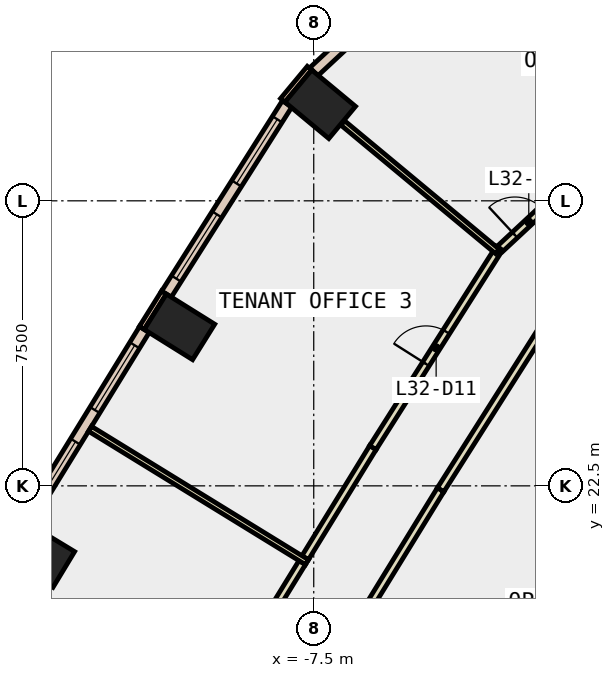
"""IFC4 building model, lengths in metres.
Left out: names, types, materials, properties, quantities, classifications, styles, units other than length and angle.
Written with IfcOpenShell. Run it as: python <this file> out.ifc"""

import sys

from ifc_helpers import new_model, si_unit, direction, frame, frame_2d, origin, origin_2d, place, context, subcontext, project, spatial, rectangle, extrude, element, fill, save


model = new_model("IFC4")
c1 = context("Model", 3, precision=1e-05, world=origin(), true_north=direction((0.0, 1.0)))
c2 = subcontext(c1, "Body", "Model", "MODEL_VIEW")
j1 = project(units=[si_unit("LENGTHUNIT", "METRE"), si_unit("PLANEANGLEUNIT", "RADIAN")], contexts=[c1])
p1 = place(None, origin())
s1 = spatial("IfcSite", under=j1, at=p1, CompositionType="ELEMENT")
p2 = place(p1, origin())
s2 = spatial("IfcBuilding", under=s1, at=p2, CompositionType="ELEMENT")
p3 = place(p2, frame((0.0, 0.0, 146.6)))
s3 = spatial("IfcBuildingStorey", under=s2, at=p3, CompositionType="ELEMENT", Elevation=146.6)
for number, where, z_axis, x_axis in (
    (1, (-7.329, 32.541, -0.4), (0.0, 0.0, 1.0), (0.639, 0.769, 0.0)),
    (2, (-11.033, 26.684, -0.4), (0.0, 0.0, 1.0), (0.53, 0.848, 0.0)),
    (3, (-14.719, 20.688, -0.4), (0.0, 0.0, 1.0), (0.518, 0.855, 0.0)),
):
    element("IfcColumn", number, at=place(p3, frame(where, z_axis=z_axis, x_axis=x_axis)), inside=s3, PredefinedType="COLUMN", context=c2, shape_type="SweptSolid", body=[
        extrude(rectangle(XDim=1.1, YDim=1.5, at=origin_2d()), origin(), (0.0, 0.0, 1.0), 4.2),
    ])
p4 = place(p3, frame((-7.612, 33.491, 0.0), z_axis=(0.0, 0.0, 1.0), x_axis=(-0.639070205934, -0.769148406933, 0.0)))
e4 = element("IfcWall", 4, at=p4, inside=s3, PredefinedType="STANDARD", context=c2, shape_type="SweptSolid", body=[
    extrude(rectangle(XDim=1.1, YDim=0.15, at=frame_2d((0.55, 0.0))), origin(), (0.0, 0.0, 1.0), 3.8),
])
p5 = place(p3, frame((-11.441, 27.588, 0.0), z_axis=(0.0, 0.0, 1.0), x_axis=(-0.52997899071, -0.848010771987, 0.0)))
e5 = element("IfcWall", 5, at=p5, inside=s3, PredefinedType="STANDARD", context=c2, shape_type="SweptSolid", body=[
    extrude(rectangle(XDim=1.1, YDim=0.15, at=frame_2d((0.55, 0.0))), origin(), (0.0, 0.0, 1.0), 3.8),
])
p6 = place(p3, frame((-4.91, 35.805, 0.0), z_axis=(0.0, 0.0, 1.0), x_axis=(-0.732121882671, -0.681173655475, 0.0)))
e6 = element("IfcWall", 6, at=p6, inside=s3, PredefinedType="STANDARD", context=c2, shape_type="SweptSolid", body=[
    extrude(rectangle(XDim=3.536, YDim=0.3, at=frame_2d((1.768, 0.0))), origin(), (0.0, 0.0, 1.0), 3.8),
])
p7 = place(p6, frame((1.068, 0.0, 0.9)))
e7 = element("IfcOpeningElement", 7, at=p7, cuts=e6, PredefinedType="OPENING", context=c2, shape_type="SweptSolid", body=[
    extrude(rectangle(XDim=1.4, YDim=2.6, at=frame_2d((0.7, 1.3))), frame((0.0, 0.16, 0.0), z_axis=(0.0, -1.0, 0.0), x_axis=(1.0, 0.0, 0.0)), (0.0, 0.0, 1.0), 0.32),
])
p8 = place(p3, frame((-8.201, 32.552, 0.0), z_axis=(0.0, 0.0, 1.0), x_axis=(-0.535403761464, -0.844596242124, 0.0)))
e8 = element("IfcWall", 8, at=p8, inside=s3, PredefinedType="STANDARD", context=c2, shape_type="SweptSolid", body=[
    extrude(rectangle(XDim=5.928, YDim=0.3, at=frame_2d((2.964, 0.0))), origin(), (0.0, 0.0, 1.0), 3.8),
])
p9 = place(p8, frame((0.482, 0.0, 0.9)))
e9 = element("IfcOpeningElement", 9, at=p9, cuts=e8, PredefinedType="OPENING", context=c2, shape_type="SweptSolid", body=[
    extrude(rectangle(XDim=2.0, YDim=2.6, at=frame_2d((1.0, 1.3))), frame((0.0, 0.16, 0.0), z_axis=(0.0, -1.0, 0.0), x_axis=(1.0, 0.0, 0.0)), (0.0, 0.0, 1.0), 0.32),
])
p10 = place(p8, frame((3.446, 0.0, 0.9)))
e10 = element("IfcOpeningElement", 10, at=p10, cuts=e8, PredefinedType="OPENING", context=c2, shape_type="SweptSolid", body=[
    extrude(rectangle(XDim=2.0, YDim=2.6, at=frame_2d((1.0, 1.3))), frame((0.0, 0.16, 0.0), z_axis=(0.0, -1.0, 0.0), x_axis=(1.0, 0.0, 0.0)), (0.0, 0.0, 1.0), 0.32),
])
p11 = place(p3, frame((-11.956, 26.614, 0.0), z_axis=(0.0, 0.0, 1.0), x_axis=(-0.523719731127, -0.851890628677, 0.0)))
e11 = element("IfcWall", 11, at=p11, inside=s3, PredefinedType="STANDARD", context=c2, shape_type="SweptSolid", body=[
    extrude(rectangle(XDim=5.952, YDim=0.3, at=frame_2d((2.976, 0.0))), origin(), (0.0, 0.0, 1.0), 3.8),
])
p12 = place(p11, frame((0.488, 0.0, 0.9)))
e12 = element("IfcOpeningElement", 12, at=p12, cuts=e11, PredefinedType="OPENING", context=c2, shape_type="SweptSolid", body=[
    extrude(rectangle(XDim=2.0, YDim=2.6, at=frame_2d((1.0, 1.3))), frame((0.0, 0.16, 0.0), z_axis=(0.0, -1.0, 0.0), x_axis=(1.0, 0.0, 0.0)), (0.0, 0.0, 1.0), 0.32),
])
p13 = place(p11, frame((3.464, 0.0, 0.9)))
e13 = element("IfcOpeningElement", 13, at=p13, cuts=e11, PredefinedType="OPENING", context=c2, shape_type="SweptSolid", body=[
    extrude(rectangle(XDim=2.0, YDim=2.6, at=frame_2d((1.0, 1.3))), frame((0.0, 0.16, 0.0), z_axis=(0.0, -1.0, 0.0), x_axis=(1.0, 0.0, 0.0)), (0.0, 0.0, 1.0), 0.32),
])
p14 = place(p3, frame((-0.988, 27.401, 0.0), z_axis=(0.0, 0.0, 1.0), x_axis=(-0.535496886312, -0.844537201519, 0.0)))
e14 = element("IfcWall", 14, at=p14, inside=s3, PredefinedType="PARTITIONING", context=c2, shape_type="SweptSolid", body=[
    extrude(rectangle(XDim=5.927, YDim=0.2, at=frame_2d((2.964, 0.0))), origin(), (0.0, 0.0, 1.0), 3.8),
])
p15 = place(p3, frame((-4.162, 22.395, 0.0), z_axis=(0.0, 0.0, 1.0), x_axis=(-0.523625371849, -0.851948631055, 0.0)))
e15 = element("IfcWall", 15, at=p15, inside=s3, PredefinedType="PARTITIONING", context=c2, shape_type="SweptSolid", body=[
    extrude(rectangle(XDim=6.927, YDim=0.2, at=frame_2d((3.463, 0.0))), origin(), (0.0, 0.0, 1.0), 3.8),
])
p16 = place(p3, frame((-2.597, 28.738, 0.0), z_axis=(0.0, 0.0, 1.0), x_axis=(0.73206471367, 0.681235095249, 0.0)))
e16 = element("IfcWall", 16, at=p16, inside=s3, PredefinedType="PARTITIONING", context=c2, shape_type="SweptSolid", body=[
    extrude(rectangle(XDim=2.065, YDim=0.2, at=frame_2d((1.033, 0.0))), origin(), (0.0, 0.0, 1.0), 3.8),
])
p17 = place(p16, frame((0.532, 0.0, 0.0)))
e17 = element("IfcOpeningElement", 17, at=p17, cuts=e16, PredefinedType="OPENING", context=c2, shape_type="SweptSolid", body=[
    extrude(rectangle(XDim=1.0, YDim=2.1, at=frame_2d((0.5, 1.05))), frame((0.0, 0.11, 0.0), z_axis=(0.0, -1.0, 0.0), x_axis=(1.0, 0.0, 0.0)), (0.0, 0.0, 1.0), 0.22),
])
p18 = place(p3, frame((-7.725, 20.608, 0.0), z_axis=(0.0, 0.0, 1.0), x_axis=(0.523645038298, 0.851936543333, 0.0)))
e18 = element("IfcWall", 18, at=p18, inside=s3, PredefinedType="PARTITIONING", context=c2, shape_type="SweptSolid", body=[
    extrude(rectangle(XDim=3.403, YDim=0.2, at=frame_2d((1.702, 0.0))), origin(), (0.0, 0.0, 1.0), 3.8),
])
p19 = place(p3, frame((-5.943, 23.507, 0.0), z_axis=(0.0, 0.0, 1.0), x_axis=(0.535529721247, 0.844516380931, 0.0)))
e19 = element("IfcWall", 19, at=p19, inside=s3, PredefinedType="PARTITIONING", context=c2, shape_type="SweptSolid", body=[
    extrude(rectangle(XDim=6.213, YDim=0.2, at=frame_2d((3.106, 0.0))), origin(), (0.0, 0.0, 1.0), 3.8),
])
p20 = place(p19, frame((2.607, 0.0, 0.0)))
e20 = element("IfcOpeningElement", 20, at=p20, cuts=e19, PredefinedType="OPENING", context=c2, shape_type="SweptSolid", body=[
    extrude(rectangle(XDim=1.0, YDim=2.1, at=frame_2d((0.5, 1.05))), frame((0.0, 0.11, 0.0), z_axis=(0.0, -1.0, 0.0), x_axis=(1.0, 0.0, 0.0)), (0.0, 0.0, 1.0), 0.22),
])
p21 = place(p3, frame((-9.586, 17.581, 0.0), z_axis=(0.0, 0.0, 1.0), x_axis=(0.523757261565, 0.851867554822, 0.0)))
e21 = element("IfcWall", 21, at=p21, inside=s3, PredefinedType="PARTITIONING", context=c2, shape_type="SweptSolid", body=[
    extrude(rectangle(XDim=3.404, YDim=0.2, at=frame_2d((1.702, 0.0))), origin(), (0.0, 0.0, 1.0), 3.8),
])
p22 = place(p3, frame((-2.67, 28.67, 0.0), z_axis=(0.0, 0.0, 1.0), x_axis=(-0.769162789992, 0.639052894909, 0.0)))
e22 = element("IfcWall", 22, at=p22, inside=s3, PredefinedType="PARTITIONING", context=c2, shape_type="SweptSolid", body=[
    extrude(rectangle(XDim=5.288, YDim=0.15, at=frame_2d((2.644, 0.0))), origin(), (0.0, 0.0, 1.0), 3.8),
])
p23 = place(p3, frame((-7.679, 20.492, 0.0), z_axis=(0.0, 0.0, 1.0), x_axis=(-0.851897179877, 0.523709074695, 0.0)))
e23 = element("IfcWall", 23, at=p23, inside=s3, PredefinedType="PARTITIONING", context=c2, shape_type="SweptSolid", body=[
    extrude(rectangle(XDim=6.7, YDim=0.15, at=frame_2d((3.35, 0.0))), origin(), (0.0, 0.0, 1.0), 3.8),
])
p24 = place(p9, origin())
e24 = element("IfcWindow", 24, at=p24, inside=s3, PartitioningType="SINGLE_PANEL", PredefinedType="WINDOW", context=c2, shape_type="SweptSolid", body=[
    extrude(rectangle(XDim=2.0, YDim=2.6, at=frame_2d((1.0, 1.3))), frame((0.0, 0.03, 0.0), z_axis=(0.0, -1.0, 0.0), x_axis=(1.0, 0.0, 0.0)), (0.0, 0.0, 1.0), 0.06),
])
fill(e9, e24)
p25 = place(p10, origin())
e25 = element("IfcWindow", 25, at=p25, inside=s3, PartitioningType="SINGLE_PANEL", PredefinedType="WINDOW", context=c2, shape_type="SweptSolid", body=[
    extrude(rectangle(XDim=2.0, YDim=2.6, at=frame_2d((1.0, 1.3))), frame((0.0, 0.03, 0.0), z_axis=(0.0, -1.0, 0.0), x_axis=(1.0, 0.0, 0.0)), (0.0, 0.0, 1.0), 0.06),
])
fill(e10, e25)
p26 = place(p12, origin())
e26 = element("IfcWindow", 26, at=p26, inside=s3, PartitioningType="SINGLE_PANEL", PredefinedType="WINDOW", context=c2, shape_type="SweptSolid", body=[
    extrude(rectangle(XDim=2.0, YDim=2.6, at=frame_2d((1.0, 1.3))), frame((0.0, 0.03, 0.0), z_axis=(0.0, -1.0, 0.0), x_axis=(1.0, 0.0, 0.0)), (0.0, 0.0, 1.0), 0.06),
])
fill(e12, e26)
p27 = place(p13, origin())
e27 = element("IfcWindow", 27, at=p27, inside=s3, PartitioningType="SINGLE_PANEL", PredefinedType="WINDOW", context=c2, shape_type="SweptSolid", body=[
    extrude(rectangle(XDim=2.0, YDim=2.6, at=frame_2d((1.0, 1.3))), frame((0.0, 0.03, 0.0), z_axis=(0.0, -1.0, 0.0), x_axis=(1.0, 0.0, 0.0)), (0.0, 0.0, 1.0), 0.06),
])
fill(e13, e27)
p28 = place(p17, origin())
e28 = element("IfcDoor", 28, at=p28, inside=s3, OperationType="SINGLE_SWING_LEFT", PredefinedType="DOOR", context=c2, shape_type="SweptSolid", body=[
    extrude(rectangle(XDim=1.0, YDim=2.1, at=frame_2d((0.5, 1.05))), frame((0.0, 0.025, 0.0), z_axis=(0.0, -1.0, 0.0), x_axis=(1.0, 0.0, 0.0)), (0.0, 0.0, 1.0), 0.05),
])
fill(e17, e28)
p29 = place(p20, origin())
e29 = element("IfcDoor", 29, at=p29, inside=s3, OperationType="SINGLE_SWING_LEFT", PredefinedType="DOOR", context=c2, shape_type="SweptSolid", body=[
    extrude(rectangle(XDim=1.0, YDim=2.1, at=frame_2d((0.5, 1.05))), frame((0.0, 0.025, 0.0), z_axis=(0.0, -1.0, 0.0), x_axis=(1.0, 0.0, 0.0)), (0.0, 0.0, 1.0), 0.05),
])
fill(e20, e29)
save(model, sys.argv[1])
